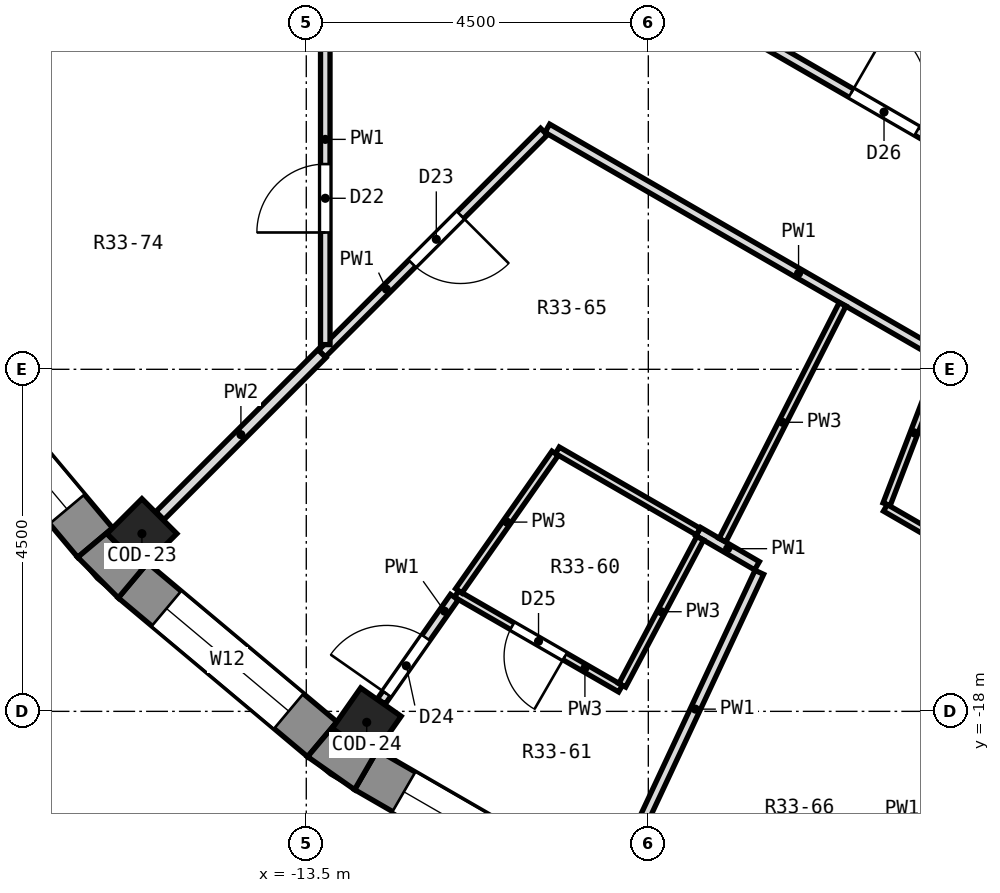
"""IFC4 building model, lengths in metres.
Left out: names, types, materials, properties, quantities, classifications, styles, units other than length and angle.
Written with IfcOpenShell. Run it as: python <this file> out.ifc"""

import sys

from ifc_helpers import new_model, si_unit, direction, frame, frame_2d, origin, origin_2d, place, context, subcontext, project, spatial, polyline, rectangle, outline, extrude, element, fill, save


model = new_model("IFC4")
c1 = context("Model", 3, precision=1e-05, world=origin(), true_north=direction((0.0, 1.0)))
c2 = subcontext(c1, "Body", "Model", "MODEL_VIEW")
j1 = project(units=[si_unit("LENGTHUNIT", "METRE"), si_unit("PLANEANGLEUNIT", "RADIAN")], contexts=[c1])
p1 = place(None, origin())
s1 = spatial("IfcSite", under=j1, at=p1, CompositionType="ELEMENT")
p2 = place(p1, origin())
s2 = spatial("IfcBuilding", under=s1, at=p2, CompositionType="ELEMENT")
p3 = place(p2, frame((0.0, 0.0, 229.7)))
s3 = spatial("IfcBuildingStorey", under=s2, at=p3, CompositionType="ELEMENT", Elevation=229.7)
for number, where, z_axis, x_axis in (
    (1, (-15.662, -15.662, 0.0), (0.0, 0.0, 1.0), (-0.707, -0.707, 0.0)),
    (2, (-12.705, -18.144, 0.0), (0.0, 0.0, 1.0), (-0.574, -0.819, 0.0)),
):
    element("IfcColumn", number, at=place(p3, frame(where, z_axis=z_axis, x_axis=x_axis)), inside=s3, PredefinedType="COLUMN", context=c2, shape_type="SweptSolid", body=[
        extrude(rectangle(XDim=0.65, YDim=0.65, at=origin_2d()), origin(), (0.0, 0.0, 1.0), 3.3),
    ])
p4 = place(p3, frame((-18.367, -13.29, 0.0), z_axis=(0.0, 0.0, 1.0), x_axis=(0.64277291405, -0.766056773982, 0.0)))
e3 = element("IfcWall", 3, at=p4, inside=s3, PredefinedType="SOLIDWALL", context=c2, shape_type="SweptSolid", body=[
    extrude(rectangle(XDim=3.252, YDim=0.6, at=frame_2d((1.626, 0.0))), origin(), (0.0, 0.0, 1.0), 2.9),
])
p5 = place(p4, frame((0.576, 0.0, 0.9)))
e4 = element("IfcOpeningElement", 4, at=p5, cuts=e3, PredefinedType="OPENING", context=c2, shape_type="SweptSolid", body=[
    extrude(rectangle(XDim=2.1, YDim=1.8, at=frame_2d((1.05, 0.9))), frame((0.0, 0.312, 0.0), z_axis=(0.0, -1.0, 0.0), x_axis=(1.0, 0.0, 0.0)), (0.0, 0.0, 1.0), 0.624),
])
p6 = place(p3, frame((-15.781, -16.277, 0.0), z_axis=(0.0, 0.0, 1.0), x_axis=(0.766056773982, -0.64277291405, 0.0)))
e5 = element("IfcWall", 5, at=p6, inside=s3, PredefinedType="SOLIDWALL", context=c2, shape_type="SweptSolid", body=[
    extrude(rectangle(XDim=3.252, YDim=0.6, at=frame_2d((1.626, 0.0))), origin(), (0.0, 0.0, 1.0), 2.9),
])
p7 = place(p6, frame((0.576, 0.0, 0.9)))
e6 = element("IfcOpeningElement", 6, at=p7, cuts=e5, PredefinedType="OPENING", context=c2, shape_type="SweptSolid", body=[
    extrude(rectangle(XDim=2.1, YDim=1.8, at=frame_2d((1.05, 0.9))), frame((0.0, 0.312, 0.0), z_axis=(0.0, -1.0, 0.0), x_axis=(1.0, 0.0, 0.0)), (0.0, 0.0, 1.0), 0.624),
])
p8 = place(p3, frame((-12.714, -18.77, 0.0), z_axis=(0.0, 0.0, 1.0), x_axis=(0.866016800201, -0.500014901547, 0.0)))
e7 = element("IfcWall", 7, at=p8, inside=s3, PredefinedType="SOLIDWALL", context=c2, shape_type="SweptSolid", body=[
    extrude(rectangle(XDim=3.252, YDim=0.6, at=frame_2d((1.626, 0.0))), origin(), (0.0, 0.0, 1.0), 2.9),
])
p9 = place(p8, frame((0.576, 0.0, 0.9)))
e8 = element("IfcOpeningElement", 8, at=p9, cuts=e7, PredefinedType="OPENING", context=c2, shape_type="SweptSolid", body=[
    extrude(rectangle(XDim=2.1, YDim=1.8, at=frame_2d((1.05, 0.9))), frame((0.0, 0.312, 0.0), z_axis=(0.0, -1.0, 0.0), x_axis=(1.0, 0.0, 0.0)), (0.0, 0.0, 1.0), 0.624),
])
p10 = place(p3, origin())
e9 = element("IfcWall", 9, at=p10, inside=s3, PredefinedType="SOLIDWALL", context=c2, shape_type="SweptSolid", body=[
    extrude(outline(polyline([(-15.973, -16.507), (-15.588, -16.047), (-15.662, -16.122), (-16.122, -15.662), (-16.047, -15.588), (-16.507, -15.973), (-15.973, -16.507)])), origin(), (0.0, 0.0, 1.0), 2.9),
])
p11 = place(p3, origin())
e10 = element("IfcWall", 10, at=p11, inside=s3, PredefinedType="SOLIDWALL", context=c2, shape_type="SweptSolid", body=[
    extrude(outline(polyline([(-12.864, -19.03), (-12.564, -18.51), (-12.625, -18.597), (-13.157, -18.224), (-13.097, -18.137), (-13.482, -18.597), (-12.864, -19.03)])), origin(), (0.0, 0.0, 1.0), 2.9),
])
p12 = place(p3, frame((-8.343, -15.635, 0.0), z_axis=(0.0, 0.0, 1.0), x_axis=(0.86407608966, -0.503361213521, 0.0)))
e11 = element("IfcWall", 11, at=p12, inside=s3, PredefinedType="PARTITIONING", context=c2, shape_type="SweptSolid", body=[
    extrude(rectangle(XDim=0.893, YDim=0.125, at=frame_2d((0.447, 0.0))), origin(), (0.0, 0.0, 1.0), 2.9),
])
p13 = place(p3, frame((-11.523, -16.456, 0.0), z_axis=(0.0, 0.0, 1.0), x_axis=(0.866105605004, -0.499861061677, 0.0)))
e12 = element("IfcWall", 12, at=p13, inside=s3, PredefinedType="PARTITIONING", context=c2, shape_type="SweptSolid", body=[
    extrude(rectangle(XDim=2.49, YDim=0.1, at=frame_2d((1.245, 0.0))), origin(), (0.0, 0.0, 1.0), 2.9),
])
p14 = place(p13, frame((0.845, 0.0, 0.0)))
e13 = element("IfcOpeningElement", 13, at=p14, cuts=e12, PredefinedType="OPENING", context=c2, shape_type="SweptSolid", body=[
    extrude(rectangle(XDim=0.8, YDim=2.1, at=frame_2d((0.4, 1.05))), frame((0.0, 0.062, 0.0), z_axis=(0.0, -1.0, 0.0), x_axis=(1.0, 0.0, 0.0)), (0.0, 0.0, 1.0), 0.124),
])
p15 = place(p3, frame((-10.196, -14.566, 0.0), z_axis=(0.0, 0.0, 1.0), x_axis=(0.866058298698, -0.49994302001, 0.0)))
e14 = element("IfcWall", 14, at=p15, inside=s3, PredefinedType="PARTITIONING", context=c2, shape_type="SweptSolid", body=[
    extrude(rectangle(XDim=2.14, YDim=0.1, at=frame_2d((1.07, 0.0))), origin(), (0.0, 0.0, 1.0), 2.9),
])
p16 = place(p3, frame((-5.881, -15.323, 0.0), z_axis=(0.0, 0.0, 1.0), x_axis=(0.86600600509, -0.50003359802, 0.0)))
e15 = element("IfcWall", 15, at=p16, inside=s3, PredefinedType="PARTITIONING", context=c2, shape_type="SweptSolid", body=[
    extrude(rectangle(XDim=1.834, YDim=0.1, at=frame_2d((0.917, 0.0))), origin(), (0.0, 0.0, 1.0), 2.9),
])
p17 = place(p3, frame((-10.329, -10.329, 0.0), z_axis=(0.0, 0.0, 1.0), x_axis=(0.866010352672, -0.500026068385, 0.0)))
e16 = element("IfcWall", 16, at=p17, inside=s3, PredefinedType="PARTITIONING", context=c2, shape_type="SweptSolid", body=[
    extrude(rectangle(XDim=7.633, YDim=0.125, at=frame_2d((3.817, 0.0))), origin(), (0.0, 0.0, 1.0), 2.9),
])
p18 = place(p3, frame((-8.572, -8.572, 0.0), z_axis=(0.0, 0.0, 1.0), x_axis=(0.865983161714, -0.500073158277, 0.0)))
e17 = element("IfcWall", 17, at=p18, inside=s3, PredefinedType="PARTITIONING", context=c2, shape_type="SweptSolid", body=[
    extrude(rectangle(XDim=6.347, YDim=0.125, at=frame_2d((3.174, 0.0))), origin(), (0.0, 0.0, 1.0), 2.9),
])
p19 = place(p18, frame((2.587, 0.0, 0.0)))
e18 = element("IfcOpeningElement", 18, at=p19, cuts=e17, PredefinedType="OPENING", context=c2, shape_type="SweptSolid", body=[
    extrude(rectangle(XDim=1.0, YDim=2.1, at=frame_2d((0.5, 1.05))), frame((0.0, 0.074, 0.0), z_axis=(0.0, -1.0, 0.0), x_axis=(1.0, 0.0, 0.0)), (0.0, 0.0, 1.0), 0.149),
])
p20 = place(p3, frame((-13.294, -13.294, 0.0), z_axis=(0.0, 0.0, 1.0), x_axis=(0.707106781187, 0.707106781187, 0.0)))
e19 = element("IfcWall", 19, at=p20, inside=s3, PredefinedType="PARTITIONING", context=c2, shape_type="SweptSolid", body=[
    extrude(rectangle(XDim=4.131, YDim=0.125, at=frame_2d((2.065, 0.0))), origin(), (0.0, 0.0, 1.0), 2.9),
])
p21 = place(p20, frame((1.678, 0.0, 0.0)))
e20 = element("IfcOpeningElement", 20, at=p21, cuts=e19, PredefinedType="OPENING", context=c2, shape_type="SweptSolid", body=[
    extrude(rectangle(XDim=0.9, YDim=2.1, at=frame_2d((0.45, 1.05))), frame((0.0, 0.074, 0.0), z_axis=(0.0, -1.0, 0.0), x_axis=(1.0, 0.0, 0.0)), (0.0, 0.0, 1.0), 0.149),
])
p22 = place(p3, frame((-15.426, -15.426, 0.0), z_axis=(0.0, 0.0, 1.0), x_axis=(0.707106781187, 0.707106781187, 0.0)))
e21 = element("IfcWall", 21, at=p22, inside=s3, PredefinedType="PARTITIONING", context=c2, shape_type="SweptSolid", body=[
    extrude(rectangle(XDim=3.014, YDim=0.15, at=frame_2d((1.507, 0.0))), origin(), (0.0, 0.0, 1.0), 2.9),
])
p23 = place(p3, frame((-11.494, -16.415, 0.0), z_axis=(0.0, 0.0, 1.0), x_axis=(0.573833166693, 0.818972219799, 0.0)))
e22 = element("IfcWall", 22, at=p23, inside=s3, PredefinedType="PARTITIONING", context=c2, shape_type="SweptSolid", body=[
    extrude(rectangle(XDim=2.209, YDim=0.1, at=frame_2d((1.104, 0.0))), origin(), (0.0, 0.0, 1.0), 2.9),
])
p24 = place(p3, frame((-12.513, -17.87, 0.0), z_axis=(0.0, 0.0, 1.0), x_axis=(0.573618789706, 0.819122386519, 0.0)))
e23 = element("IfcWall", 23, at=p24, inside=s3, PredefinedType="PARTITIONING", context=c2, shape_type="SweptSolid", body=[
    extrude(rectangle(XDim=1.676, YDim=0.125, at=frame_2d((0.838, 0.0))), origin(), (0.0, 0.0, 1.0), 2.9),
])
p25 = place(p24, frame((0.123, 0.0, 0.0)))
e24 = element("IfcOpeningElement", 24, at=p25, cuts=e23, PredefinedType="OPENING", context=c2, shape_type="SweptSolid", body=[
    extrude(rectangle(XDim=0.9, YDim=2.1, at=frame_2d((0.45, 1.05))), frame((0.0, 0.074, 0.0), z_axis=(0.0, -1.0, 0.0), x_axis=(1.0, 0.0, 0.0)), (0.0, 0.0, 1.0), 0.149),
])
p26 = place(p3, frame((-9.343, -17.657, 0.0), z_axis=(0.0, 0.0, 1.0), x_axis=(0.467882595904, 0.883790629307, 0.0)))
e25 = element("IfcWall", 25, at=p26, inside=s3, PredefinedType="PARTITIONING", context=c2, shape_type="SweptSolid", body=[
    extrude(rectangle(XDim=2.189, YDim=0.1, at=frame_2d((1.094, 0.0))), origin(), (0.0, 0.0, 1.0), 2.9),
])
p27 = place(p3, frame((-8.024, -15.747, 0.0), z_axis=(0.0, 0.0, 1.0), x_axis=(0.453766079843, 0.891120836242, 0.0)))
e26 = element("IfcWall", 26, at=p27, inside=s3, PredefinedType="PARTITIONING", context=c2, shape_type="SweptSolid", body=[
    extrude(rectangle(XDim=3.481, YDim=0.1, at=frame_2d((1.74, 0.0))), origin(), (0.0, 0.0, 1.0), 2.9),
])
p28 = place(p3, frame((-9.222, -19.77, 0.0), z_axis=(0.0, 0.0, 1.0), x_axis=(0.423534651218, 0.905879903308, 0.0)))
e27 = element("IfcWall", 27, at=p28, inside=s3, PredefinedType="PARTITIONING", context=c2, shape_type="SweptSolid", body=[
    extrude(rectangle(XDim=3.973, YDim=0.125, at=frame_2d((1.986, 0.0))), origin(), (0.0, 0.0, 1.0), 2.9),
])
p29 = place(p3, frame((-5.865, -15.275, 0.0), z_axis=(0.0, 0.0, 1.0), x_axis=(0.358857215778, 0.93339246766, 0.0)))
e28 = element("IfcWall", 28, at=p29, inside=s3, PredefinedType="PARTITIONING", context=c2, shape_type="SweptSolid", body=[
    extrude(rectangle(XDim=2.014, YDim=0.1, at=frame_2d((1.007, 0.0))), origin(), (0.0, 0.0, 1.0), 2.9),
])
p30 = place(p3, frame((-13.25, -13.175, 0.0), z_axis=(0.0, 0.0, 1.0), x_axis=(0.0, 1.0, 0.0)))
e29 = element("IfcWall", 29, at=p30, inside=s3, PredefinedType="PARTITIONING", context=c2, shape_type="SweptSolid", body=[
    extrude(rectangle(XDim=3.925, YDim=0.125, at=frame_2d((1.962, 0.0))), origin(), (0.0, 0.0, 1.0), 2.9),
])
p31 = place(p30, frame((1.475, 0.0, 0.0)))
e30 = element("IfcOpeningElement", 30, at=p31, cuts=e29, PredefinedType="OPENING", context=c2, shape_type="SweptSolid", body=[
    extrude(rectangle(XDim=0.9, YDim=2.1, at=frame_2d((0.45, 1.05))), frame((0.0, 0.074, 0.0), z_axis=(0.0, -1.0, 0.0), x_axis=(1.0, 0.0, 0.0)), (0.0, 0.0, 1.0), 0.149),
])
p32 = place(p5, origin())
e31 = element("IfcWindow", 31, at=p32, inside=s3, PartitioningType="SINGLE_PANEL", PredefinedType="WINDOW", context=c2, shape_type="SweptSolid", body=[
    extrude(rectangle(XDim=2.1, YDim=1.8, at=frame_2d((1.05, 0.9))), frame((0.0, 0.18, 0.0), z_axis=(0.0, -1.0, 0.0), x_axis=(1.0, 0.0, 0.0)), (0.0, 0.0, 1.0), 0.06),
])
fill(e4, e31)
p33 = place(p7, origin())
e32 = element("IfcWindow", 32, at=p33, inside=s3, PartitioningType="SINGLE_PANEL", PredefinedType="WINDOW", context=c2, shape_type="SweptSolid", body=[
    extrude(rectangle(XDim=2.1, YDim=1.8, at=frame_2d((1.05, 0.9))), frame((0.0, 0.18, 0.0), z_axis=(0.0, -1.0, 0.0), x_axis=(1.0, 0.0, 0.0)), (0.0, 0.0, 1.0), 0.06),
])
fill(e6, e32)
p34 = place(p9, origin())
e33 = element("IfcWindow", 33, at=p34, inside=s3, PartitioningType="SINGLE_PANEL", PredefinedType="WINDOW", context=c2, shape_type="SweptSolid", body=[
    extrude(rectangle(XDim=2.1, YDim=1.8, at=frame_2d((1.05, 0.9))), frame((0.0, 0.18, 0.0), z_axis=(0.0, -1.0, 0.0), x_axis=(1.0, 0.0, 0.0)), (0.0, 0.0, 1.0), 0.06),
])
fill(e8, e33)
p35 = place(p31, origin())
e34 = element("IfcDoor", 34, at=p35, inside=s3, OperationType="SINGLE_SWING_LEFT", PredefinedType="DOOR", context=c2, shape_type="SweptSolid", body=[
    extrude(rectangle(XDim=0.9, YDim=2.1, at=frame_2d((0.45, 1.05))), frame((0.0, 0.025, 0.0), z_axis=(0.0, -1.0, 0.0), x_axis=(1.0, 0.0, 0.0)), (0.0, 0.0, 1.0), 0.05),
])
fill(e30, e34)
p36 = place(p21, frame((0.9, 0.0, 0.0), z_axis=(0.0, 0.0, 1.0), x_axis=(-1.0, 0.0, 0.0)))
e35 = element("IfcDoor", 35, at=p36, inside=s3, OperationType="SINGLE_SWING_LEFT", PredefinedType="DOOR", context=c2, shape_type="SweptSolid", body=[
    extrude(rectangle(XDim=0.9, YDim=2.1, at=frame_2d((0.45, 1.05))), frame((0.0, 0.025, 0.0), z_axis=(0.0, -1.0, 0.0), x_axis=(1.0, 0.0, 0.0)), (0.0, 0.0, 1.0), 0.05),
])
fill(e20, e35)
p37 = place(p25, origin())
e36 = element("IfcDoor", 36, at=p37, inside=s3, OperationType="SINGLE_SWING_LEFT", PredefinedType="DOOR", context=c2, shape_type="SweptSolid", body=[
    extrude(rectangle(XDim=0.9, YDim=2.1, at=frame_2d((0.45, 1.05))), frame((0.0, 0.025, 0.0), z_axis=(0.0, -1.0, 0.0), x_axis=(1.0, 0.0, 0.0)), (0.0, 0.0, 1.0), 0.05),
])
fill(e24, e36)
p38 = place(p14, frame((0.8, 0.0, 0.0), z_axis=(0.0, 0.0, 1.0), x_axis=(-1.0, 0.0, 0.0)))
e37 = element("IfcDoor", 37, at=p38, inside=s3, OperationType="SINGLE_SWING_LEFT", PredefinedType="DOOR", context=c2, shape_type="SweptSolid", body=[
    extrude(rectangle(XDim=0.8, YDim=2.1, at=frame_2d((0.4, 1.05))), frame((0.0, 0.025, 0.0), z_axis=(0.0, -1.0, 0.0), x_axis=(1.0, 0.0, 0.0)), (0.0, 0.0, 1.0), 0.05),
])
fill(e13, e37)
p39 = place(p19, origin())
e38 = element("IfcDoor", 38, at=p39, inside=s3, OperationType="SINGLE_SWING_LEFT", PredefinedType="DOOR", context=c2, shape_type="SweptSolid", body=[
    extrude(rectangle(XDim=1.0, YDim=2.1, at=frame_2d((0.5, 1.05))), frame((0.0, 0.025, 0.0), z_axis=(0.0, -1.0, 0.0), x_axis=(1.0, 0.0, 0.0)), (0.0, 0.0, 1.0), 0.05),
])
fill(e18, e38)
save(model, sys.argv[1])
